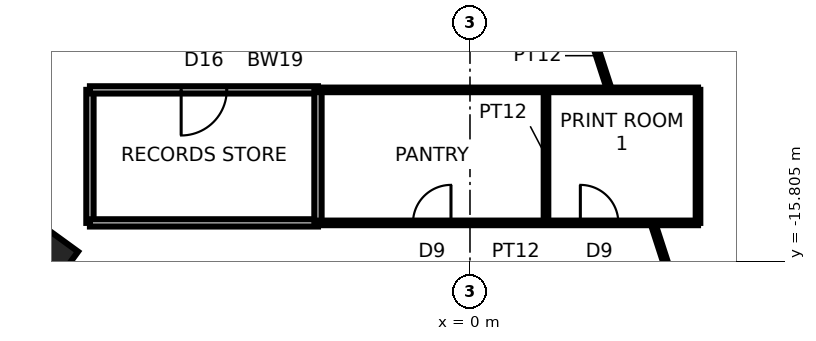
"""IFC4 building model, lengths in metres.
Left out: names, types, materials, properties, quantities, classifications, styles, units other than length and angle.
Written with IfcOpenShell. Run it as: python <this file> out.ifc"""

import sys

from ifc_helpers import new_model, si_unit, direction, frame, frame_2d, origin, origin_2d, place, context, subcontext, project, spatial, rectangle, extrude, element, fill, save


model = new_model("IFC4")
c1 = context("Model", 3, precision=1e-05, world=origin(), true_north=direction((0.0, 1.0)))
c2 = subcontext(c1, "Body", "Model", "MODEL_VIEW")
j1 = project(units=[si_unit("LENGTHUNIT", "METRE"), si_unit("PLANEANGLEUNIT", "RADIAN")], contexts=[c1])
p1 = place(None, origin())
s1 = spatial("IfcSite", under=j1, at=p1, CompositionType="ELEMENT")
p2 = place(p1, origin())
s2 = spatial("IfcBuilding", under=s1, at=p2, CompositionType="ELEMENT")
p3 = place(p2, frame((0.0, 0.0, 96.3)))
s3 = spatial("IfcBuildingStorey", under=s2, at=p3, CompositionType="ELEMENT", Elevation=96.3)
p4 = place(p3, frame((-11.43, -15.733, 0.0), z_axis=(0.0, 0.0, 1.0), x_axis=(-0.587785252292, -0.809016994375, 0.0)))
e1 = element("IfcColumn", 1, at=p4, inside=s3, PredefinedType="COLUMN", context=c2, shape_type="SweptSolid", body=[
    extrude(rectangle(XDim=1.6, YDim=1.6, at=origin_2d()), origin(), (0.0, 0.0, 1.0), 3.9),
])
p5 = place(p3, frame((-10.0, -11.3, 0.0), z_axis=(0.0, 0.0, 1.0), x_axis=(0.0, -1.0, 0.0)))
e2 = element("IfcWall", 2, at=p5, inside=s3, PredefinedType="SOLIDWALL", context=c2, shape_type="SweptSolid", body=[
    extrude(rectangle(XDim=3.5, YDim=0.19, at=frame_2d((1.75, 0.0))), origin(), (0.0, 0.0, 1.0), 3.74),
])
p6 = place(p3, frame((-4.0, -11.3, 0.0), z_axis=(0.0, 0.0, 1.0), x_axis=(-1.0, 0.0, 0.0)))
e3 = element("IfcWall", 3, at=p6, inside=s3, PredefinedType="SOLIDWALL", context=c2, shape_type="SweptSolid", body=[
    extrude(rectangle(XDim=6.0, YDim=0.19, at=frame_2d((3.0, 0.0))), origin(), (0.0, 0.0, 1.0), 3.74),
])
p7 = place(p6, frame((2.4, 0.0, 0.0)))
e4 = element("IfcOpeningElement", 4, at=p7, cuts=e3, PredefinedType="OPENING", context=c2, shape_type="SweptSolid", body=[
    extrude(rectangle(XDim=1.2, YDim=2.1, at=frame_2d((0.6, 1.05))), frame((0.0, 0.105, 0.0), z_axis=(0.0, -1.0, 0.0), x_axis=(1.0, 0.0, 0.0)), (0.0, 0.0, 1.0), 0.21),
])
p8 = place(p3, frame((-10.0, -14.8, 0.0), z_axis=(0.0, 0.0, 1.0), x_axis=(1.0, 0.0, 0.0)))
e5 = element("IfcWall", 5, at=p8, inside=s3, PredefinedType="SOLIDWALL", context=c2, shape_type="SweptSolid", body=[
    extrude(rectangle(XDim=6.0, YDim=0.19, at=frame_2d((3.0, 0.0))), origin(), (0.0, 0.0, 1.0), 3.74),
])
p9 = place(p3, frame((-4.0, -11.3, 0.0), z_axis=(0.0, 0.0, 1.0), x_axis=(0.0, -1.0, 0.0)))
e6 = element("IfcWall", 6, at=p9, inside=s3, PredefinedType="SOLIDWALL", context=c2, shape_type="SweptSolid", body=[
    extrude(rectangle(XDim=3.5, YDim=0.19, at=frame_2d((1.75, 0.0))), origin(), (0.0, 0.0, 1.0), 3.74),
])
p10 = place(p3, frame((-4.0, -14.8, 0.0), z_axis=(0.0, 0.0, 1.0), x_axis=(1.0, 0.0, 0.0)))
e7 = element("IfcWall", 7, at=p10, inside=s3, PredefinedType="PARTITIONING", context=c2, shape_type="SweptSolid", body=[
    extrude(rectangle(XDim=10.0, YDim=0.12, at=frame_2d((5.0, 0.0))), origin(), (0.0, 0.0, 1.0), 3.74),
])
p11 = place(p10, frame((2.5, 0.0, 0.0)))
e8 = element("IfcOpeningElement", 8, at=p11, cuts=e7, PredefinedType="OPENING", context=c2, shape_type="SweptSolid", body=[
    extrude(rectangle(XDim=1.0, YDim=2.4, at=frame_2d((0.5, 1.2))), frame((0.0, 0.07, 0.0), z_axis=(0.0, -1.0, 0.0), x_axis=(1.0, 0.0, 0.0)), (0.0, 0.0, 1.0), 0.14),
])
p12 = place(p10, frame((6.904, 0.0, 0.0)))
e9 = element("IfcOpeningElement", 9, at=p12, cuts=e7, PredefinedType="OPENING", context=c2, shape_type="SweptSolid", body=[
    extrude(rectangle(XDim=1.0, YDim=2.4, at=frame_2d((0.5, 1.2))), frame((0.0, 0.07, 0.0), z_axis=(0.0, -1.0, 0.0), x_axis=(1.0, 0.0, 0.0)), (0.0, 0.0, 1.0), 0.14),
])
p13 = place(p3, frame((6.0, -11.3, 0.0), z_axis=(0.0, 0.0, 1.0), x_axis=(-1.0, 0.0, 0.0)))
e10 = element("IfcWall", 10, at=p13, inside=s3, PredefinedType="PARTITIONING", context=c2, shape_type="SweptSolid", body=[
    extrude(rectangle(XDim=10.0, YDim=0.12, at=frame_2d((5.0, 0.0))), origin(), (0.0, 0.0, 1.0), 3.74),
])
p14 = place(p3, frame((2.0, -11.3, 0.0), z_axis=(0.0, 0.0, 1.0), x_axis=(0.0, -1.0, 0.0)))
e11 = element("IfcWall", 11, at=p14, inside=s3, PredefinedType="PARTITIONING", context=c2, shape_type="SweptSolid", body=[
    extrude(rectangle(XDim=3.5, YDim=0.12, at=frame_2d((1.75, 0.0))), origin(), (0.0, 0.0, 1.0), 3.74),
])
p15 = place(p3, frame((3.672, -11.3, 0.0), z_axis=(0.0, 0.0, 1.0), x_axis=(-0.309059822154, 0.95104259964, 0.0)))
e12 = element("IfcWall", 12, at=p15, inside=s3, PredefinedType="PARTITIONING", context=c2, shape_type="SweptSolid", body=[
    extrude(rectangle(XDim=1.893, YDim=0.12, at=frame_2d((0.946, 0.0))), origin(), (0.0, 0.0, 1.0), 2.94),
])
p16 = place(p3, frame((6.829, -21.016, 0.0), z_axis=(0.0, 0.0, 1.0), x_axis=(-0.309024414348, 0.951054105368, 0.0)))
e13 = element("IfcWall", 13, at=p16, inside=s3, PredefinedType="PARTITIONING", context=c2, shape_type="SweptSolid", body=[
    extrude(rectangle(XDim=6.536, YDim=0.12, at=frame_2d((3.268, 0.0))), origin(), (0.0, 0.0, 1.0), 2.94),
])
p17 = place(p3, frame((6.0, -14.8, 0.0), z_axis=(0.0, 0.0, 1.0), x_axis=(0.0, 1.0, 0.0)))
e14 = element("IfcWall", 14, at=p17, inside=s3, PredefinedType="PARTITIONING", context=c2, shape_type="SweptSolid", body=[
    extrude(rectangle(XDim=3.5, YDim=0.12, at=frame_2d((1.75, 0.0))), origin(), (0.0, 0.0, 1.0), 3.74),
])
p18 = place(p7, origin())
e15 = element("IfcDoor", 15, at=p18, inside=s3, OperationType="SINGLE_SWING_RIGHT", PredefinedType="DOOR", context=c2, shape_type="SweptSolid", body=[
    extrude(rectangle(XDim=1.2, YDim=2.1, at=frame_2d((0.6, 1.05))), frame((0.0, 0.025, 0.0), z_axis=(0.0, -1.0, 0.0), x_axis=(1.0, 0.0, 0.0)), (0.0, 0.0, 1.0), 0.05),
])
fill(e4, e15)
p19 = place(p11, origin())
e16 = element("IfcDoor", 16, at=p19, inside=s3, OperationType="SINGLE_SWING_RIGHT", PredefinedType="DOOR", context=c2, shape_type="SweptSolid", body=[
    extrude(rectangle(XDim=1.0, YDim=2.4, at=frame_2d((0.5, 1.2))), frame((0.0, 0.025, 0.0), z_axis=(0.0, -1.0, 0.0), x_axis=(1.0, 0.0, 0.0)), (0.0, 0.0, 1.0), 0.05),
])
fill(e8, e16)
p20 = place(p12, origin())
e17 = element("IfcDoor", 17, at=p20, inside=s3, OperationType="SINGLE_SWING_LEFT", PredefinedType="DOOR", context=c2, shape_type="SweptSolid", body=[
    extrude(rectangle(XDim=1.0, YDim=2.4, at=frame_2d((0.5, 1.2))), frame((0.0, 0.025, 0.0), z_axis=(0.0, -1.0, 0.0), x_axis=(1.0, 0.0, 0.0)), (0.0, 0.0, 1.0), 0.05),
])
fill(e9, e17)
save(model, sys.argv[1])
